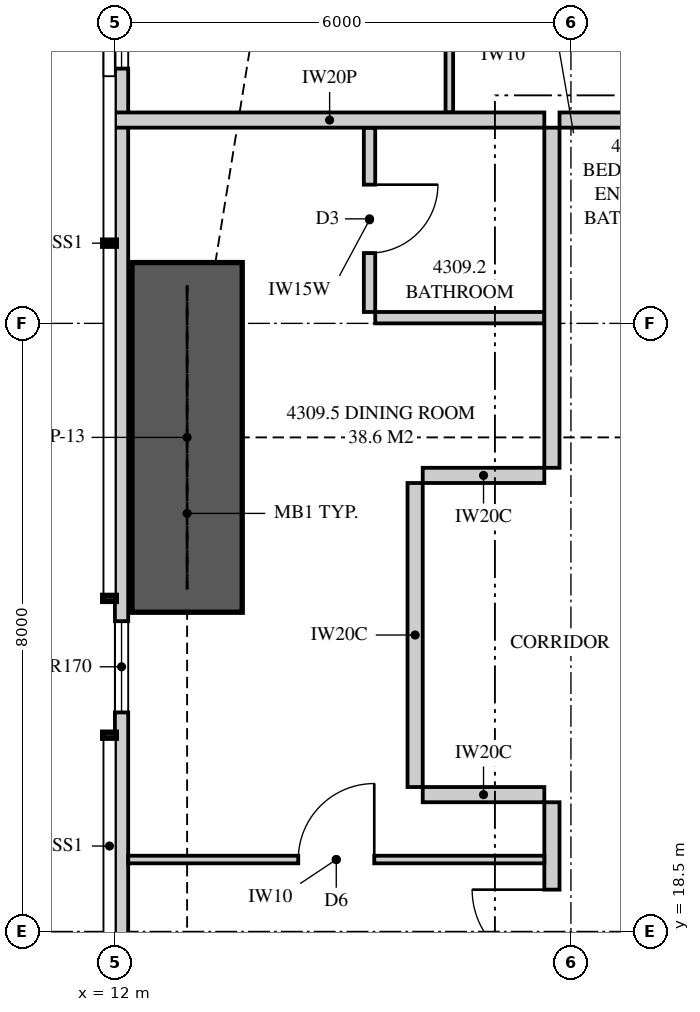
"""IFC4 building model, lengths in metres.
Left out: names, types, materials, properties, quantities, classifications, styles, units other than length and angle.
Written with IfcOpenShell. Run it as: python <this file> out.ifc"""

import sys

from ifc_helpers import new_model, si_unit, direction, frame, frame_2d, origin, place, context, subcontext, project, spatial, polyline, rectangle, outline, extrude, element, fill, save


model = new_model("IFC4")
c1 = context("Model", 3, precision=1e-05, world=origin(), true_north=direction((0.0, 1.0)))
c2 = subcontext(c1, "Body", "Model", "MODEL_VIEW")
j1 = project(units=[si_unit("LENGTHUNIT", "METRE"), si_unit("PLANEANGLEUNIT", "RADIAN")], contexts=[c1])
p1 = place(None, origin())
s1 = spatial("IfcSite", under=j1, at=p1, CompositionType="ELEMENT")
p2 = place(p1, origin())
s2 = spatial("IfcBuilding", under=s1, at=p2, CompositionType="ELEMENT")
p3 = place(p2, frame((0.0, 0.0, 161.05)))
s3 = spatial("IfcBuildingStorey", under=s2, at=p3, CompositionType="ELEMENT", Elevation=161.05)
p4 = place(p3, frame((12.087, 32.949, 0.0), z_axis=(0.0, 0.0, 1.0), x_axis=(0.0, -1.0, 0.0)))
e1 = element("IfcWall", 1, at=p4, inside=s3, PredefinedType="SOLIDWALL", context=c2, shape_type="SweptSolid", body=[
    extrude(outline(polyline([(0.0, 0.0), (29.897, 0.0), (29.897, 3.11), (20.191, 3.11), (20.191, 2.15), (20.051, 2.15), (20.051, 3.11), (19.949, 3.11), (19.949, 2.15), (7.949, 2.15), (7.949, 3.11), (7.823, 3.11), (7.823, 2.15), (7.73, 2.15), (7.73, 3.11), (0.0, 3.11), (0.0, 0.0)])), frame((0.0, 0.087, 0.0), z_axis=(0.0, -1.0, 0.0), x_axis=(1.0, 0.0, 0.0)), (0.0, 0.0, 1.0), 0.175),
])
p5 = place(p4, frame((1.297, 0.0, 0.4)))
e2 = element("IfcOpeningElement", 2, at=p5, cuts=e1, PredefinedType="OPENING", context=c2, shape_type="SweptSolid", body=[
    extrude(rectangle(XDim=1.8, YDim=1.7, at=frame_2d((0.9, 0.85))), frame((0.0, 0.097, 0.0), z_axis=(0.0, -1.0, 0.0), x_axis=(1.0, 0.0, 0.0)), (0.0, 0.0, 1.0), 0.195),
])
p6 = place(p4, frame((10.367, 0.0, 0.4)))
e3 = element("IfcOpeningElement", 3, at=p6, cuts=e1, PredefinedType="OPENING", context=c2, shape_type="SweptSolid", body=[
    extrude(rectangle(XDim=1.2, YDim=1.7, at=frame_2d((0.6, 0.85))), frame((0.0, 0.097, 0.0), z_axis=(0.0, -1.0, 0.0), x_axis=(1.0, 0.0, 0.0)), (0.0, 0.0, 1.0), 0.195),
])
p7 = place(p4, frame((15.083, 0.0, 0.4)))
e4 = element("IfcOpeningElement", 4, at=p7, cuts=e1, PredefinedType="OPENING", context=c2, shape_type="SweptSolid", body=[
    extrude(rectangle(XDim=2.4, YDim=1.7, at=frame_2d((1.2, 0.85))), frame((0.0, 0.097, 0.0), z_axis=(0.0, -1.0, 0.0), x_axis=(1.0, 0.0, 0.0)), (0.0, 0.0, 1.0), 0.195),
])
p8 = place(p4, frame((22.624, 0.0, 0.0)))
e5 = element("IfcOpeningElement", 5, at=p8, cuts=e1, PredefinedType="OPENING", context=c2, shape_type="SweptSolid", body=[
    extrude(rectangle(XDim=1.8, YDim=2.1, at=frame_2d((0.9, 1.05))), frame((0.0, 0.097, 0.0), z_axis=(0.0, -1.0, 0.0), x_axis=(1.0, 0.0, 0.0)), (0.0, 0.0, 1.0), 0.195),
])
p9 = place(p4, frame((26.301, 0.0, 0.4)))
e6 = element("IfcOpeningElement", 6, at=p9, cuts=e1, PredefinedType="OPENING", context=c2, shape_type="SweptSolid", body=[
    extrude(rectangle(XDim=1.8, YDim=1.7, at=frame_2d((0.9, 0.85))), frame((0.0, 0.097, 0.0), z_axis=(0.0, -1.0, 0.0), x_axis=(1.0, 0.0, 0.0)), (0.0, 0.0, 1.0), 0.195),
])
p10 = place(p3, frame((17.85, 29.175, 0.0), z_axis=(0.0, 0.0, 1.0), x_axis=(1.0, 0.0, 0.0)))
e7 = element("IfcWall", 7, at=p10, inside=s3, PredefinedType="PARTITIONING", context=c2, shape_type="SweptSolid", body=[
    extrude(rectangle(XDim=2.65, YDim=0.2, at=frame_2d((1.325, 0.0))), origin(), (0.0, 0.0, 1.0), 3.11),
])
p11 = place(p10, frame((1.2, 0.0, 0.0)))
e8 = element("IfcOpeningElement", 8, at=p11, cuts=e7, PredefinedType="OPENING", context=c2, shape_type="SweptSolid", body=[
    extrude(rectangle(XDim=1.05, YDim=2.2, at=frame_2d((0.525, 1.1))), frame((0.0, 0.11, 0.0), z_axis=(0.0, -1.0, 0.0), x_axis=(1.0, 0.0, 0.0)), (0.0, 0.0, 1.0), 0.22),
])
p12 = place(p3, frame((16.4, 32.204, 0.0), z_axis=(0.0, 0.0, 1.0), x_axis=(0.0, -1.0, 0.0)))
e9 = element("IfcWall", 9, at=p12, inside=s3, PredefinedType="PARTITIONING", context=c2, shape_type="SweptSolid", body=[
    extrude(rectangle(XDim=2.929, YDim=0.1, at=frame_2d((1.464, 0.0))), origin(), (0.0, 0.0, 1.0), 3.11),
])
p13 = place(p12, frame((0.977, 0.0, 0.0)))
e10 = element("IfcOpeningElement", 10, at=p13, cuts=e9, PredefinedType="OPENING", context=c2, shape_type="SweptSolid", body=[
    extrude(rectangle(XDim=0.9, YDim=2.1, at=frame_2d((0.45, 1.05))), frame((0.0, 0.06, 0.0), z_axis=(0.0, -1.0, 0.0), x_axis=(1.0, 0.0, 0.0)), (0.0, 0.0, 1.0), 0.12),
])
p14 = place(p3, frame((12.0, 29.175, 0.0), z_axis=(0.0, 0.0, 1.0), x_axis=(1.0, 0.0, 0.0)))
e11 = element("IfcWall", 11, at=p14, inside=s3, PredefinedType="PARTITIONING", context=c2, shape_type="SweptSolid", body=[
    extrude(outline(polyline([(0.0, 0.0), (5.65, 0.0), (5.65, 3.11), (2.547, 3.11), (2.547, 2.15), (0.703, 2.15), (0.703, 3.11), (0.0, 3.11), (0.0, 0.0)])), frame((0.0, 0.1, 0.0), z_axis=(0.0, -1.0, 0.0), x_axis=(1.0, 0.0, 0.0)), (0.0, 0.0, 1.0), 0.2),
])
p15 = place(p3, frame((17.75, 7.925, 0.0), z_axis=(0.0, 0.0, 1.0), x_axis=(0.0, 1.0, 0.0)))
e12 = element("IfcWall", 12, at=p15, inside=s3, PredefinedType="PARTITIONING", context=c2, shape_type="SweptSolid", body=[
    extrude(outline(polyline([(0.0, 0.0), (12.275, 0.0), (12.275, 3.11), (5.412, 3.11), (5.412, 2.541), (4.738, 2.541), (4.738, 3.11), (0.0, 3.11), (0.0, 0.0)])), frame((0.0, 0.1, 0.0), z_axis=(0.0, -1.0, 0.0), x_axis=(1.0, 0.0, 0.0)), (0.0, 0.0, 1.0), 0.2),
])
p16 = place(p15, frame((10.075, 0.0, 0.0)))
e13 = element("IfcOpeningElement", 13, at=p16, cuts=e12, PredefinedType="OPENING", context=c2, shape_type="SweptSolid", body=[
    extrude(rectangle(XDim=1.05, YDim=2.2, at=frame_2d((0.525, 1.1))), frame((0.0, 0.11, 0.0), z_axis=(0.0, -1.0, 0.0), x_axis=(1.0, 0.0, 0.0)), (0.0, 0.0, 1.0), 0.22),
])
p17 = place(p3, frame((15.35, 26.65, 0.0), z_axis=(0.0, 0.0, 1.0), x_axis=(0.0, 1.0, 0.0)))
e14 = element("IfcWall", 14, at=p17, inside=s3, PredefinedType="PLUMBINGWALL", context=c2, shape_type="SweptSolid", body=[
    extrude(rectangle(XDim=2.425, YDim=0.15, at=frame_2d((1.212, 0.0))), origin(), (0.0, 0.0, 1.0), 3.11),
])
p18 = place(p17, frame((0.775, 0.0, 0.0)))
e15 = element("IfcOpeningElement", 15, at=p18, cuts=e14, PredefinedType="OPENING", context=c2, shape_type="SweptSolid", body=[
    extrude(rectangle(XDim=0.9, YDim=2.1, at=frame_2d((0.45, 1.05))), frame((0.0, 0.085, 0.0), z_axis=(0.0, -1.0, 0.0), x_axis=(1.0, 0.0, 0.0)), (0.0, 0.0, 1.0), 0.17),
])
p19 = place(p3, frame((15.425, 26.575, 0.0), z_axis=(0.0, 0.0, 1.0), x_axis=(1.0, 0.0, 0.0)))
e16 = element("IfcWall", 16, at=p19, inside=s3, PredefinedType="PLUMBINGWALL", context=c2, shape_type="SweptSolid", body=[
    extrude(rectangle(XDim=2.225, YDim=0.15, at=frame_2d((1.112, 0.0))), origin(), (0.0, 0.0, 1.0), 3.11),
])
p20 = place(p3, frame((12.175, 19.446, 0.0), z_axis=(0.0, 0.0, 1.0), x_axis=(1.0, 0.0, 0.0)))
e17 = element("IfcWall", 17, at=p20, inside=s3, PredefinedType="PARTITIONING", context=c2, shape_type="SweptSolid", body=[
    extrude(outline(polyline([(0.0, 0.0), (5.475, 0.0), (5.475, 3.11), (1.635, 3.11), (1.635, 2.15), (0.0, 2.15), (0.0, 3.11), (0.0, 0.0)])), frame((0.0, 0.05, 0.0), z_axis=(0.0, -1.0, 0.0), x_axis=(1.0, 0.0, 0.0)), (0.0, 0.0, 1.0), 0.1),
])
p21 = place(p20, frame((2.238, 0.0, 0.0)))
e18 = element("IfcOpeningElement", 18, at=p21, cuts=e17, PredefinedType="OPENING", context=c2, shape_type="SweptSolid", body=[
    extrude(rectangle(XDim=1.0, YDim=2.1, at=frame_2d((0.5, 1.05))), frame((0.0, 0.06, 0.0), z_axis=(0.0, -1.0, 0.0), x_axis=(1.0, 0.0, 0.0)), (0.0, 0.0, 1.0), 0.12),
])
p22 = place(p3, frame((17.75, 24.6, 0.0), z_axis=(0.0, 0.0, 1.0), x_axis=(0.0, 1.0, 0.0)))
e19 = element("IfcWall", 19, at=p22, inside=s3, PredefinedType="PARTITIONING", context=c2, shape_type="SweptSolid", body=[
    extrude(outline(polyline([(0.0, 0.0), (4.475, 0.0), (4.475, 3.11), (0.737, 3.11), (0.737, 2.541), (0.062, 2.541), (0.062, 3.11), (0.0, 3.11), (0.0, 0.0)])), frame((0.0, 0.1, 0.0), z_axis=(0.0, -1.0, 0.0), x_axis=(1.0, 0.0, 0.0)), (0.0, 0.0, 1.0), 0.2),
])
p23 = place(p3, frame((15.95, 20.4, 0.0), z_axis=(0.0, 0.0, 1.0), x_axis=(0.0, 1.0, 0.0)))
e20 = element("IfcWall", 20, at=p23, inside=s3, PredefinedType="PARTITIONING", context=c2, shape_type="SweptSolid", body=[
    extrude(rectangle(XDim=4.0, YDim=0.2, at=frame_2d((2.0, 0.0))), origin(), (0.0, 0.0, 1.0), 3.11),
])
for number, where, z_axis, x_axis in (
    (21, (17.65, 20.3, 0.0), (0.0, 0.0, 1.0), (-1.0, 0.0, 0.0)),
    (22, (17.65, 24.5, 0.0), (0.0, 0.0, 1.0), (-1.0, 0.0, 0.0)),
):
    element("IfcWall", number, at=place(p3, frame(where, z_axis=z_axis, x_axis=x_axis)), inside=s3, PredefinedType="PARTITIONING", context=c2, shape_type="SweptSolid", body=[
        extrude(rectangle(XDim=1.6, YDim=0.2, at=frame_2d((0.8, 0.0))), origin(), (0.0, 0.0, 1.0), 3.11),
    ])
p24 = place(p3, frame((12.95, 22.7, 0.0), z_axis=(0.0, 0.0, 1.0), x_axis=(0.0, 1.0, 0.0)))
e23 = element("IfcWall", 23, at=p24, inside=s3, PredefinedType="SHEAR", context=c2, shape_type="SweptSolid", body=[
    extrude(rectangle(XDim=4.6, YDim=1.45, at=frame_2d((2.3, 0.0))), origin(), (0.0, 0.0, 1.0), 3.35),
])
p25 = place(p5, origin())
e24 = element("IfcWindow", 24, at=p25, inside=s3, PartitioningType="SINGLE_PANEL", PredefinedType="WINDOW", context=c2, shape_type="SweptSolid", body=[
    extrude(rectangle(XDim=1.8, YDim=1.7, at=frame_2d((0.9, 0.85))), frame((0.0, 0.03, 0.0), z_axis=(0.0, -1.0, 0.0), x_axis=(1.0, 0.0, 0.0)), (0.0, 0.0, 1.0), 0.06),
])
fill(e2, e24)
p26 = place(p6, origin())
e25 = element("IfcWindow", 25, at=p26, inside=s3, PartitioningType="SINGLE_PANEL", PredefinedType="WINDOW", context=c2, shape_type="SweptSolid", body=[
    extrude(rectangle(XDim=1.2, YDim=1.7, at=frame_2d((0.6, 0.85))), frame((0.0, 0.03, 0.0), z_axis=(0.0, -1.0, 0.0), x_axis=(1.0, 0.0, 0.0)), (0.0, 0.0, 1.0), 0.06),
])
fill(e3, e25)
p27 = place(p16, origin())
e26 = element("IfcDoor", 26, at=p27, inside=s3, OperationType="SINGLE_SWING_RIGHT", PredefinedType="DOOR", context=c2, shape_type="SweptSolid", body=[
    extrude(rectangle(XDim=1.05, YDim=2.2, at=frame_2d((0.525, 1.1))), frame((0.0, 0.025, 0.0), z_axis=(0.0, -1.0, 0.0), x_axis=(1.0, 0.0, 0.0)), (0.0, 0.0, 1.0), 0.05),
])
fill(e13, e26)
p28 = place(p18, frame((0.9, 0.0, 0.0), z_axis=(0.0, 0.0, 1.0), x_axis=(-1.0, 0.0, 0.0)))
e27 = element("IfcDoor", 27, at=p28, inside=s3, OperationType="SINGLE_SWING_LEFT", PredefinedType="DOOR", context=c2, shape_type="SweptSolid", body=[
    extrude(rectangle(XDim=0.9, YDim=2.1, at=frame_2d((0.45, 1.05))), frame((0.0, 0.025, 0.0), z_axis=(0.0, -1.0, 0.0), x_axis=(1.0, 0.0, 0.0)), (0.0, 0.0, 1.0), 0.05),
])
fill(e15, e27)
p29 = place(p21, origin())
e28 = element("IfcDoor", 28, at=p29, inside=s3, OperationType="SINGLE_SWING_RIGHT", PredefinedType="DOOR", context=c2, shape_type="SweptSolid", body=[
    extrude(rectangle(XDim=1.0, YDim=2.1, at=frame_2d((0.5, 1.05))), frame((0.0, 0.025, 0.0), z_axis=(0.0, -1.0, 0.0), x_axis=(1.0, 0.0, 0.0)), (0.0, 0.0, 1.0), 0.05),
])
fill(e18, e28)
save(model, sys.argv[1])
